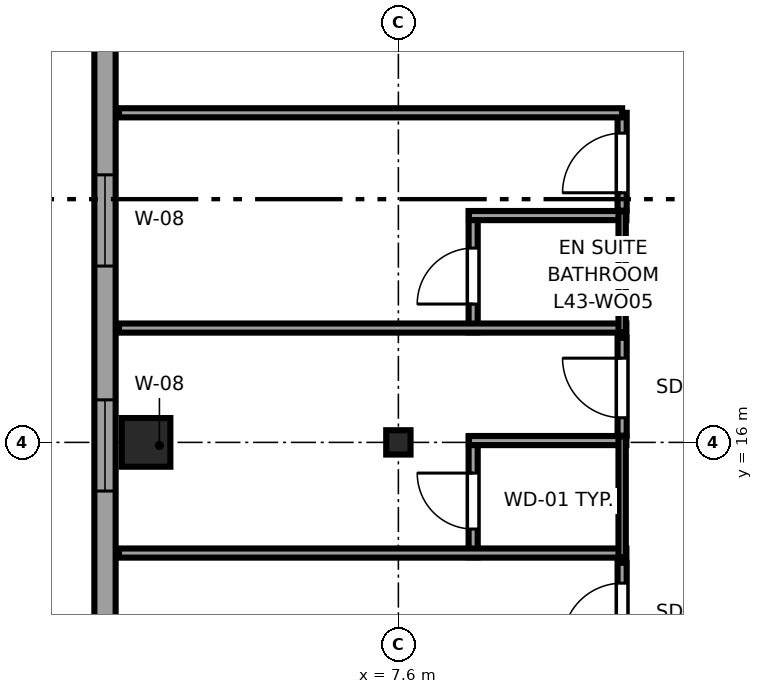
"""IFC4 building model, lengths in metres.
Left out: names, types, materials, properties, quantities, classifications, styles, units other than length and angle.
Written with IfcOpenShell. Run it as: python <this file> out.ifc"""

import sys

from ifc_helpers import new_model, si_unit, direction, frame, frame_2d, origin, origin_2d, place, context, subcontext, project, spatial, rectangle, i_section, extrude, source, transform, mapped, element, fill, save


model = new_model("IFC4")
c1 = context("Model", 3, precision=1e-05, world=origin(), true_north=direction((0.0, 1.0)))
c2 = subcontext(c1, "Body", "Model", "MODEL_VIEW")
j1 = project(units=[si_unit("LENGTHUNIT", "METRE"), si_unit("PLANEANGLEUNIT", "RADIAN")], contexts=[c1])
p1 = place(None, origin())
s1 = spatial("IfcSite", under=j1, at=p1, CompositionType="ELEMENT")
p2 = place(p1, origin())
s2 = spatial("IfcBuilding", under=s1, at=p2, CompositionType="ELEMENT")
p3 = place(p2, frame((0.0, 0.0, 164.8)))
s3 = spatial("IfcBuildingStorey", under=s2, at=p3, CompositionType="ELEMENT", Elevation=164.8)
m1 = source(origin(), c2, "Body", "SweptSolid", [
    extrude(rectangle(XDim=0.8, YDim=0.8, at=origin_2d()), origin(), (0.0, 0.0, 1.0), 3.55),
])
p4 = place(p3, frame((3.45, 16.0, 0.0), z_axis=(0.0, 0.0, 1.0), x_axis=(1.0, 0.0, 0.0)))
e1 = element("IfcColumn", 1, at=p4, inside=s3, PredefinedType="COLUMN", context=c2, shape_type="MappedRepresentation", body=[
    mapped(m1, transform((0.0, 0.0, 0.0), x_axis=(1.0, 0.0, 0.0), y_axis=(0.0, 1.0, 0.0), z_axis=(0.0, 0.0, 1.0), scale=1.0)),
])
m2 = source(origin(), c2, "Body", "SweptSolid", [
    extrude(i_section(OverallWidth=0.4, OverallDepth=0.4, WebThickness=0.02, FlangeThickness=0.035, at=origin_2d()), origin(), (0.0, 0.0, 1.0), 3.55),
])
p5 = place(p3, frame((7.6, 16.0, 0.0), z_axis=(0.0, 0.0, 1.0), x_axis=(1.0, 0.0, 0.0)))
e2 = element("IfcColumn", 2, at=p5, inside=s3, PredefinedType="COLUMN", context=c2, shape_type="MappedRepresentation", body=[
    mapped(m2, transform((0.0, 0.0, 0.0), x_axis=(1.0, 0.0, 0.0), y_axis=(0.0, 1.0, 0.0), z_axis=(0.0, 0.0, 1.0), scale=1.0)),
])
p6 = place(p3, frame((2.775, 41.583, 0.0), z_axis=(0.0, 0.0, 1.0), x_axis=(0.0, -1.0, 0.0)))
e3 = element("IfcWall", 3, at=p6, inside=s3, PredefinedType="SOLIDWALL", context=c2, shape_type="SweptSolid", body=[
    extrude(rectangle(XDim=34.566, YDim=0.35, at=frame_2d((17.283, 0.0))), origin(), (0.0, 0.0, 1.0), 3.37),
])
p7 = place(p6, frame((1.485, 0.0, 0.68)))
e4 = element("IfcOpeningElement", 4, at=p7, cuts=e3, PredefinedType="OPENING", context=c2, shape_type="SweptSolid", body=[
    extrude(rectangle(XDim=2.4, YDim=1.9, at=frame_2d((1.2, 0.95))), frame((0.0, 0.185, 0.0), z_axis=(0.0, -1.0, 0.0), x_axis=(1.0, 0.0, 0.0)), (0.0, 0.0, 1.0), 0.37),
])
p8 = place(p6, frame((9.827, 0.0, 0.68)))
e5 = element("IfcOpeningElement", 5, at=p8, cuts=e3, PredefinedType="OPENING", context=c2, shape_type="SweptSolid", body=[
    extrude(rectangle(XDim=2.4, YDim=1.9, at=frame_2d((1.2, 0.95))), frame((0.0, 0.185, 0.0), z_axis=(0.0, -1.0, 0.0), x_axis=(1.0, 0.0, 0.0)), (0.0, 0.0, 1.0), 0.37),
])
p9 = place(p6, frame((32.079, 0.0, 0.62)))
e6 = element("IfcOpeningElement", 6, at=p9, cuts=e3, PredefinedType="OPENING", context=c2, shape_type="SweptSolid", body=[
    extrude(rectangle(XDim=1.5, YDim=1.55, at=frame_2d((0.75, 0.775))), frame((0.0, 0.185, 0.0), z_axis=(0.0, -1.0, 0.0), x_axis=(1.0, 0.0, 0.0)), (0.0, 0.0, 1.0), 0.37),
])
p10 = place(p6, frame((28.583, 0.0, 0.62)))
e7 = element("IfcOpeningElement", 7, at=p10, cuts=e3, PredefinedType="OPENING", context=c2, shape_type="SweptSolid", body=[
    extrude(rectangle(XDim=1.5, YDim=1.55, at=frame_2d((0.75, 0.775))), frame((0.0, 0.185, 0.0), z_axis=(0.0, -1.0, 0.0), x_axis=(1.0, 0.0, 0.0)), (0.0, 0.0, 1.0), 0.37),
])
p11 = place(p6, frame((24.883, 0.0, 0.62)))
e8 = element("IfcOpeningElement", 8, at=p11, cuts=e3, PredefinedType="OPENING", context=c2, shape_type="SweptSolid", body=[
    extrude(rectangle(XDim=1.5, YDim=1.55, at=frame_2d((0.75, 0.775))), frame((0.0, 0.185, 0.0), z_axis=(0.0, -1.0, 0.0), x_axis=(1.0, 0.0, 0.0)), (0.0, 0.0, 1.0), 0.37),
])
p12 = place(p6, frame((21.183, 0.0, 0.62)))
e9 = element("IfcOpeningElement", 9, at=p12, cuts=e3, PredefinedType="OPENING", context=c2, shape_type="SweptSolid", body=[
    extrude(rectangle(XDim=1.5, YDim=1.55, at=frame_2d((0.75, 0.775))), frame((0.0, 0.185, 0.0), z_axis=(0.0, -1.0, 0.0), x_axis=(1.0, 0.0, 0.0)), (0.0, 0.0, 1.0), 0.37),
])
p13 = place(p3, frame((8.83, 14.11, 0.0), z_axis=(0.0, 0.0, 1.0), x_axis=(0.0, 1.0, 0.0)))
e10 = element("IfcWall", 10, at=p13, inside=s3, PredefinedType="PARTITIONING", context=c2, shape_type="SweptSolid", body=[
    extrude(rectangle(XDim=1.99, YDim=0.15, at=frame_2d((0.995, 0.0))), origin(), (0.0, 0.0, 1.0), 3.37),
])
p14 = place(p13, frame((0.465, 0.0, 0.0)))
e11 = element("IfcOpeningElement", 11, at=p14, cuts=e10, PredefinedType="OPENING", context=c2, shape_type="SweptSolid", body=[
    extrude(rectangle(XDim=0.92, YDim=2.01, at=frame_2d((0.46, 1.005))), frame((0.0, 0.085, 0.0), z_axis=(0.0, -1.0, 0.0), x_axis=(1.0, 0.0, 0.0)), (0.0, 0.0, 1.0), 0.17),
])
p15 = place(p3, frame((3.005, 14.18, 0.0), z_axis=(0.0, 0.0, 1.0), x_axis=(1.0, 0.0, 0.0)))
e12 = element("IfcWall", 12, at=p15, inside=s3, PredefinedType="PARTITIONING", context=c2, shape_type="SweptSolid", body=[
    extrude(rectangle(XDim=8.345, YDim=0.15, at=frame_2d((4.173, 0.0))), origin(), (0.0, 0.0, 1.0), 3.37),
])
p16 = place(p3, frame((8.76, 16.03, 0.0), z_axis=(0.0, 0.0, 1.0), x_axis=(1.0, 0.0, 0.0)))
e13 = element("IfcWall", 13, at=p16, inside=s3, PredefinedType="PARTITIONING", context=c2, shape_type="SweptSolid", body=[
    extrude(rectangle(XDim=2.59, YDim=0.15, at=frame_2d((1.295, 0.0))), origin(), (0.0, 0.0, 1.0), 2.758),
])
p17 = place(p3, frame((11.28, 14.11, 0.0), z_axis=(0.0, 0.0, 1.0), x_axis=(0.0, 1.0, 0.0)))
e14 = element("IfcWall", 14, at=p17, inside=s3, PredefinedType="PLUMBINGWALL", context=c2, shape_type="SweptSolid", body=[
    extrude(rectangle(XDim=1.99, YDim=0.12, at=frame_2d((0.995, 0.0))), origin(), (0.0, 0.0, 1.0), 3.001),
])
p18 = place(p3, frame((8.83, 17.81, 0.0), z_axis=(0.0, 0.0, 1.0), x_axis=(0.0, 1.0, 0.0)))
e15 = element("IfcWall", 15, at=p18, inside=s3, PredefinedType="PARTITIONING", context=c2, shape_type="SweptSolid", body=[
    extrude(rectangle(XDim=1.99, YDim=0.15, at=frame_2d((0.995, 0.0))), origin(), (0.0, 0.0, 1.0), 3.37),
])
p19 = place(p18, frame((0.465, 0.0, 0.0)))
e16 = element("IfcOpeningElement", 16, at=p19, cuts=e15, PredefinedType="OPENING", context=c2, shape_type="SweptSolid", body=[
    extrude(rectangle(XDim=0.92, YDim=2.01, at=frame_2d((0.46, 1.005))), frame((0.0, 0.085, 0.0), z_axis=(0.0, -1.0, 0.0), x_axis=(1.0, 0.0, 0.0)), (0.0, 0.0, 1.0), 0.17),
])
p20 = place(p3, frame((3.005, 17.88, 0.0), z_axis=(0.0, 0.0, 1.0), x_axis=(1.0, 0.0, 0.0)))
e17 = element("IfcWall", 17, at=p20, inside=s3, PredefinedType="PARTITIONING", context=c2, shape_type="SweptSolid", body=[
    extrude(rectangle(XDim=8.345, YDim=0.15, at=frame_2d((4.173, 0.0))), origin(), (0.0, 0.0, 1.0), 3.37),
])
p21 = place(p3, frame((8.76, 19.73, 0.0), z_axis=(0.0, 0.0, 1.0), x_axis=(1.0, 0.0, 0.0)))
e18 = element("IfcWall", 18, at=p21, inside=s3, PredefinedType="PARTITIONING", context=c2, shape_type="SweptSolid", body=[
    extrude(rectangle(XDim=2.59, YDim=0.15, at=frame_2d((1.295, 0.0))), origin(), (0.0, 0.0, 1.0), 3.37),
])
p22 = place(p3, frame((11.28, 17.81, 0.0), z_axis=(0.0, 0.0, 1.0), x_axis=(0.0, 1.0, 0.0)))
e19 = element("IfcWall", 19, at=p22, inside=s3, PredefinedType="PLUMBINGWALL", context=c2, shape_type="SweptSolid", body=[
    extrude(rectangle(XDim=1.99, YDim=0.12, at=frame_2d((0.995, 0.0))), origin(), (0.0, 0.0, 1.0), 3.001),
])
p23 = place(p3, frame((11.28, 12.41, 0.0), z_axis=(0.0, 0.0, 1.0), x_axis=(0.0, 1.0, 0.0)))
e20 = element("IfcWall", 20, at=p23, inside=s3, PredefinedType="PARTITIONING", context=c2, shape_type="SweptSolid", body=[
    extrude(rectangle(XDim=1.61, YDim=0.15, at=frame_2d((0.805, 0.0))), origin(), (0.0, 0.0, 1.0), 3.001),
])
p24 = place(p23, frame((0.295, 0.0, 0.0)))
e21 = element("IfcOpeningElement", 21, at=p24, cuts=e20, PredefinedType="OPENING", context=c2, shape_type="SweptSolid", body=[
    extrude(rectangle(XDim=0.98, YDim=2.12, at=frame_2d((0.49, 1.06))), frame((0.0, 0.085, 0.0), z_axis=(0.0, -1.0, 0.0), x_axis=(1.0, 0.0, 0.0)), (0.0, 0.0, 1.0), 0.17),
])
p25 = place(p3, frame((11.28, 16.11, 0.0), z_axis=(0.0, 0.0, 1.0), x_axis=(0.0, 1.0, 0.0)))
e22 = element("IfcWall", 22, at=p25, inside=s3, PredefinedType="PARTITIONING", context=c2, shape_type="SweptSolid", body=[
    extrude(rectangle(XDim=1.61, YDim=0.15, at=frame_2d((0.805, 0.0))), origin(), (0.0, 0.0, 1.0), 3.001),
])
p26 = place(p25, frame((0.295, 0.0, 0.0)))
e23 = element("IfcOpeningElement", 23, at=p26, cuts=e22, PredefinedType="OPENING", context=c2, shape_type="SweptSolid", body=[
    extrude(rectangle(XDim=0.98, YDim=2.12, at=frame_2d((0.49, 1.06))), frame((0.0, 0.085, 0.0), z_axis=(0.0, -1.0, 0.0), x_axis=(1.0, 0.0, 0.0)), (0.0, 0.0, 1.0), 0.17),
])
p27 = place(p3, frame((11.28, 19.81, 0.0), z_axis=(0.0, 0.0, 1.0), x_axis=(0.0, 1.0, 0.0)))
e24 = element("IfcWall", 24, at=p27, inside=s3, PredefinedType="PARTITIONING", context=c2, shape_type="SweptSolid", body=[
    extrude(rectangle(XDim=1.61, YDim=0.15, at=frame_2d((0.805, 0.0))), origin(), (0.0, 0.0, 1.0), 3.001),
])
p28 = place(p27, frame((0.295, 0.0, 0.0)))
e25 = element("IfcOpeningElement", 25, at=p28, cuts=e24, PredefinedType="OPENING", context=c2, shape_type="SweptSolid", body=[
    extrude(rectangle(XDim=0.98, YDim=2.12, at=frame_2d((0.49, 1.06))), frame((0.0, 0.085, 0.0), z_axis=(0.0, -1.0, 0.0), x_axis=(1.0, 0.0, 0.0)), (0.0, 0.0, 1.0), 0.17),
])
p29 = place(p3, frame((3.005, 21.42, 0.0), z_axis=(0.0, 0.0, 1.0), x_axis=(1.0, 0.0, 0.0)))
e26 = element("IfcWall", 26, at=p29, inside=s3, PredefinedType="PARTITIONING", context=c2, shape_type="SweptSolid", body=[
    extrude(rectangle(XDim=8.275, YDim=0.15, at=frame_2d((4.138, 0.0))), origin(), (0.0, 0.0, 1.0), 3.37),
])
m3 = source(origin(), c2, "Body", "SweptSolid", [
    extrude(rectangle(XDim=1.5, YDim=1.55, at=frame_2d((0.75, 0.775))), frame((0.0, 0.09, 0.0), z_axis=(0.0, -1.0, 0.0), x_axis=(1.0, 0.0, 0.0)), (0.0, 0.0, 1.0), 0.06),
])
p30 = place(p11, origin())
e27 = element("IfcWindow", 27, at=p30, inside=s3, PartitioningType="SINGLE_PANEL", PredefinedType="WINDOW", context=c2, shape_type="MappedRepresentation", body=[
    mapped(m3, transform((0.0, 0.0, 0.0), x_axis=(1.0, 0.0, 0.0), y_axis=(0.0, 1.0, 0.0), z_axis=(0.0, 0.0, 1.0), scale=1.0)),
])
fill(e8, e27)
p31 = place(p12, origin())
e28 = element("IfcWindow", 28, at=p31, inside=s3, PartitioningType="SINGLE_PANEL", PredefinedType="WINDOW", context=c2, shape_type="MappedRepresentation", body=[
    mapped(m3, transform((0.0, 0.0, 0.0), x_axis=(1.0, 0.0, 0.0), y_axis=(0.0, 1.0, 0.0), z_axis=(0.0, 0.0, 1.0), scale=1.0)),
])
fill(e9, e28)
m4 = source(origin(), c2, "Body", "SweptSolid", [
    extrude(rectangle(XDim=0.92, YDim=2.01, at=frame_2d((0.46, 1.005))), frame((0.0, 0.025, 0.0), z_axis=(0.0, -1.0, 0.0), x_axis=(1.0, 0.0, 0.0)), (0.0, 0.0, 1.0), 0.05),
])
p32 = place(p14, origin())
e29 = element("IfcDoor", 29, at=p32, inside=s3, OperationType="SINGLE_SWING_RIGHT", PredefinedType="DOOR", context=c2, shape_type="MappedRepresentation", body=[
    mapped(m4, transform((0.0, 0.0, 0.0), x_axis=(1.0, 0.0, 0.0), y_axis=(0.0, 1.0, 0.0), z_axis=(0.0, 0.0, 1.0), scale=1.0)),
])
fill(e11, e29)
p33 = place(p19, origin())
e30 = element("IfcDoor", 30, at=p33, inside=s3, OperationType="SINGLE_SWING_LEFT", PredefinedType="DOOR", context=c2, shape_type="MappedRepresentation", body=[
    mapped(m4, transform((0.0, 0.0, 0.0), x_axis=(1.0, 0.0, 0.0), y_axis=(0.0, 1.0, 0.0), z_axis=(0.0, 0.0, 1.0), scale=1.0)),
])
fill(e16, e30)
m5 = source(origin(), c2, "Body", "SweptSolid", [
    extrude(rectangle(XDim=0.98, YDim=2.12, at=frame_2d((0.49, 1.06))), frame((0.0, 0.025, 0.0), z_axis=(0.0, -1.0, 0.0), x_axis=(1.0, 0.0, 0.0)), (0.0, 0.0, 1.0), 0.05),
])
p34 = place(p24, origin())
e31 = element("IfcDoor", 31, at=p34, inside=s3, OperationType="SINGLE_SWING_LEFT", PredefinedType="DOOR", context=c2, shape_type="MappedRepresentation", body=[
    mapped(m5, transform((0.0, 0.0, 0.0), x_axis=(1.0, 0.0, 0.0), y_axis=(0.0, 1.0, 0.0), z_axis=(0.0, 0.0, 1.0), scale=1.0)),
])
fill(e21, e31)
p35 = place(p26, origin())
e32 = element("IfcDoor", 32, at=p35, inside=s3, OperationType="SINGLE_SWING_RIGHT", PredefinedType="DOOR", context=c2, shape_type="MappedRepresentation", body=[
    mapped(m5, transform((0.0, 0.0, 0.0), x_axis=(1.0, 0.0, 0.0), y_axis=(0.0, 1.0, 0.0), z_axis=(0.0, 0.0, 1.0), scale=1.0)),
])
fill(e23, e32)
p36 = place(p28, origin())
e33 = element("IfcDoor", 33, at=p36, inside=s3, OperationType="SINGLE_SWING_LEFT", PredefinedType="DOOR", context=c2, shape_type="MappedRepresentation", body=[
    mapped(m5, transform((0.0, 0.0, 0.0), x_axis=(1.0, 0.0, 0.0), y_axis=(0.0, 1.0, 0.0), z_axis=(0.0, 0.0, 1.0), scale=1.0)),
])
fill(e25, e33)
save(model, sys.argv[1])
